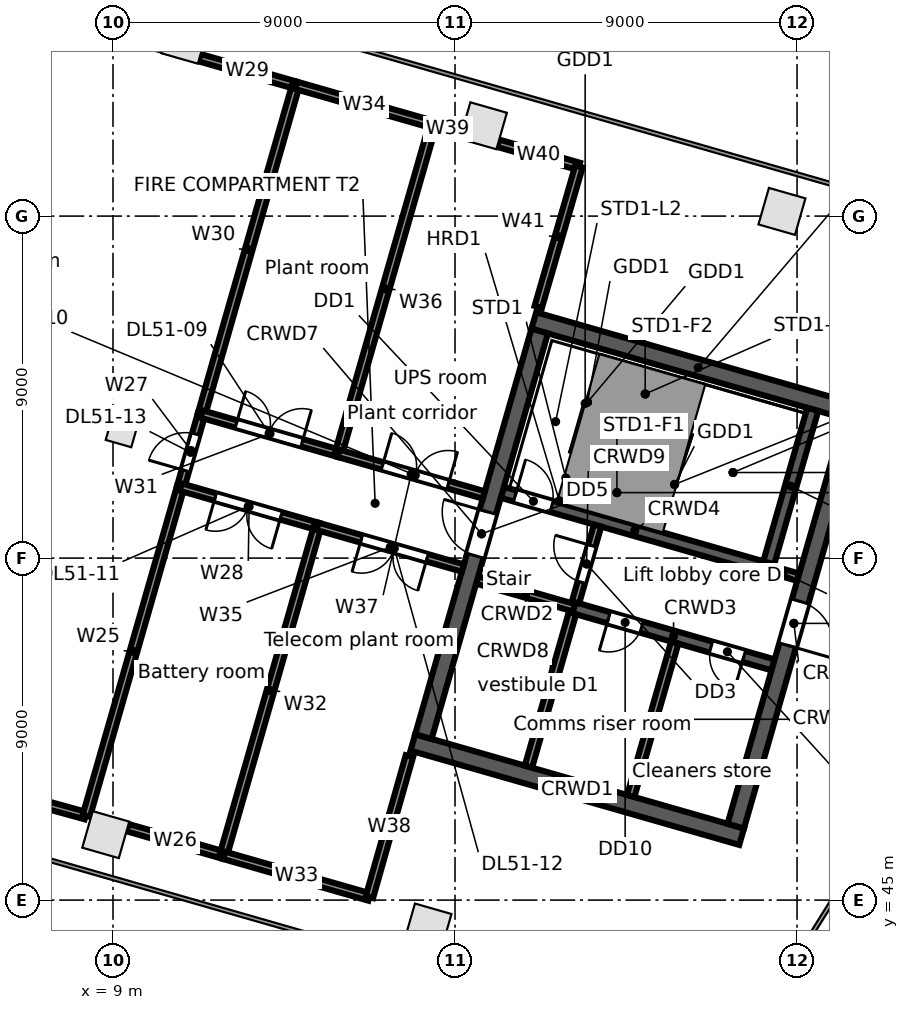
"""IFC4 building model, lengths in metres.
Left out: names, types, materials, properties, quantities, classifications, styles, units other than length and angle.
Written with IfcOpenShell. Run it as: python <this file> out.ifc"""

import sys

from ifc_helpers import new_model, si_unit, direction, frame, frame_2d, origin, origin_2d, place, context, subcontext, project, spatial, rectangle, extrude, element, fill, save


model = new_model("IFC4")
c1 = context("Model", 3, precision=1e-05, world=origin(), true_north=direction((0.0, 1.0)))
c2 = subcontext(c1, "Body", "Model", "MODEL_VIEW")
j1 = project(units=[si_unit("LENGTHUNIT", "METRE"), si_unit("PLANEANGLEUNIT", "RADIAN")], contexts=[c1])
p1 = place(None, origin())
s1 = spatial("IfcSite", under=j1, at=p1, CompositionType="ELEMENT")
p2 = place(p1, origin())
s2 = spatial("IfcBuilding", under=s1, at=p2, CompositionType="ELEMENT")
p3 = place(p2, frame((0.0, 0.0, 230.9)))
s3 = spatial("IfcBuildingStorey", under=s2, at=p3, CompositionType="ELEMENT", Elevation=230.9)
for number, where, z_axis, x_axis in (
    (1, (26.603, 63.124, 0.0), (0.0, 0.0, 1.0), (-0.961, 0.276, 0.0)),
    (2, (18.746, 65.376, 0.0), (0.0, 0.0, 1.0), (-0.961, 0.276, 0.0)),
    (3, (10.89, 67.629, 0.0), (0.0, 0.0, 1.0), (-0.961, 0.276, 0.0)),
    (4, (8.81, 46.722, 0.0), (0.0, 0.0, 1.0), (0.961, -0.276, 0.0)),
    (5, (17.288, 44.291, 0.0), (0.0, 0.0, 1.0), (0.961, -0.276, 0.0)),
):
    element("IfcColumn", number, at=place(p3, frame(where, z_axis=z_axis, x_axis=x_axis)), inside=s3, PredefinedType="COLUMN", context=c2, shape_type="SweptSolid", body=[
        extrude(rectangle(XDim=1.0, YDim=1.0, at=origin_2d()), origin(), (0.0, 0.0, 1.0), 7.8),
    ])
p4 = place(p3, frame((9.241, 57.35, 0.0), z_axis=(0.0, 0.0, 1.0), x_axis=(0.961261695938, -0.275637355817, 0.0)))
e6 = element("IfcColumn", 6, at=p4, inside=s3, PredefinedType="COLUMN", context=c2, shape_type="SweptSolid", body=[
    extrude(rectangle(XDim=0.7, YDim=0.7, at=origin_2d()), origin(), (0.0, 0.0, 1.0), 7.8),
])
p5 = place(p3, frame((16.89, 49.149, 0.0), z_axis=(0.0, 0.0, 1.0), x_axis=(0.96126248289, -0.275634611374, 0.0)))
e7 = element("IfcWall", 7, at=p5, inside=s3, PredefinedType="SOLIDWALL", context=c2, shape_type="SweptSolid", body=[
    extrude(rectangle(XDim=9.0, YDim=0.45, at=frame_2d((4.5, 0.0))), origin(), (0.0, 0.0, 1.0), 7.52),
])
p6 = place(p3, frame((18.583, 53.423, 0.0), z_axis=(0.0, 0.0, 1.0), x_axis=(0.961259287968, -0.275645753268, 0.0)))
e8 = element("IfcWall", 8, at=p6, inside=s3, PredefinedType="SOLIDWALL", context=c2, shape_type="SweptSolid", body=[
    extrude(rectangle(XDim=2.65, YDim=0.2, at=frame_2d((1.325, 0.0))), origin(), (0.0, 0.0, 1.0), 7.52),
])
p7 = place(p3, frame((21.131, 52.692, 0.0), z_axis=(0.0, 0.0, 1.0), x_axis=(0.961261488075, -0.275638080722, 0.0)))
e9 = element("IfcWall", 9, at=p7, inside=s3, PredefinedType="SOLIDWALL", context=c2, shape_type="SweptSolid", body=[
    extrude(rectangle(XDim=5.45, YDim=0.3, at=frame_2d((2.725, 0.0))), origin(), (0.0, 0.0, 1.0), 7.52),
])
p8 = place(p7, frame((0.95, 0.0, 0.0)))
e10 = element("IfcOpeningElement", 10, at=p8, cuts=e9, PredefinedType="OPENING", context=c2, shape_type="SweptSolid", body=[
    extrude(rectangle(XDim=0.9, YDim=2.1, at=frame_2d((0.45, 1.05))), frame((0.0, 0.16, 0.0), z_axis=(0.0, -1.0, 0.0), x_axis=(1.0, 0.0, 0.0)), (0.0, 0.0, 1.0), 0.32),
])
p9 = place(p7, frame((3.75, 0.0, 0.0)))
e11 = element("IfcOpeningElement", 11, at=p9, cuts=e9, PredefinedType="OPENING", context=c2, shape_type="SweptSolid", body=[
    extrude(rectangle(XDim=0.9, YDim=2.1, at=frame_2d((0.45, 1.05))), frame((0.0, 0.16, 0.0), z_axis=(0.0, -1.0, 0.0), x_axis=(1.0, 0.0, 0.0)), (0.0, 0.0, 1.0), 0.32),
])
p10 = place(p3, frame((19.245, 55.73, 0.0), z_axis=(0.0, 0.0, 1.0), x_axis=(0.961263007877, -0.275632780503, 0.0)))
e12 = element("IfcWall", 12, at=p10, inside=s3, PredefinedType="SOLIDWALL", context=c2, shape_type="SweptSolid", body=[
    extrude(rectangle(XDim=7.25, YDim=0.3, at=frame_2d((3.625, 0.0))), origin(), (0.0, 0.0, 1.0), 7.52),
])
p11 = place(p10, frame((0.35, 0.0, 0.0)))
e13 = element("IfcOpeningElement", 13, at=p11, cuts=e12, PredefinedType="OPENING", context=c2, shape_type="SweptSolid", body=[
    extrude(rectangle(XDim=1.0, YDim=2.1, at=frame_2d((0.5, 1.05))), frame((0.0, 0.16, 0.0), z_axis=(0.0, -1.0, 0.0), x_axis=(1.0, 0.0, 0.0)), (0.0, 0.0, 1.0), 0.32),
])
p12 = place(p3, frame((26.214, 53.732, 0.0), z_axis=(0.0, 0.0, 1.0), x_axis=(0.961241665642, -0.275707200184, 0.0)))
e14 = element("IfcWall", 14, at=p12, inside=s3, PredefinedType="SOLIDWALL", context=c2, shape_type="SweptSolid", body=[
    extrude(rectangle(XDim=0.85, YDim=0.2, at=frame_2d((0.425, 0.0))), origin(), (0.0, 0.0, 1.0), 7.52),
])
p13 = place(p3, frame((20.073, 60.252, 0.0), z_axis=(0.0, 0.0, 1.0), x_axis=(0.96126248289, -0.275634611374, 0.0)))
e15 = element("IfcWall", 15, at=p13, inside=s3, PredefinedType="SOLIDWALL", context=c2, shape_type="SweptSolid", body=[
    extrude(rectangle(XDim=9.0, YDim=0.45, at=frame_2d((4.5, 0.0))), origin(), (0.0, 0.0, 1.0), 7.52),
])
p14 = place(p3, frame((17.168, 49.303, 0.0), z_axis=(0.0, 0.0, 1.0), x_axis=(0.275638974822, 0.961261231695, 0.0)))
e16 = element("IfcWall", 16, at=p14, inside=s3, PredefinedType="SOLIDWALL", context=c2, shape_type="SweptSolid", body=[
    extrude(rectangle(XDim=11.1, YDim=0.45, at=frame_2d((5.55, 0.0))), origin(), (0.0, 0.0, 1.0), 7.52),
])
p15 = place(p14, frame((4.95, 0.0, 0.0)))
e17 = element("IfcOpeningElement", 17, at=p15, cuts=e16, PredefinedType="OPENING", context=c2, shape_type="SweptSolid", body=[
    extrude(rectangle(XDim=1.2, YDim=2.1, at=frame_2d((0.6, 1.05))), frame((0.0, 0.235, 0.0), z_axis=(0.0, -1.0, 0.0), x_axis=(1.0, 0.0, 0.0)), (0.0, 0.0, 1.0), 0.47),
])
p16 = place(p3, frame((19.932, 48.511, 0.0), z_axis=(0.0, 0.0, 1.0), x_axis=(0.275642273411, 0.961260285827, 0.0)))
e18 = element("IfcWall", 18, at=p16, inside=s3, PredefinedType="SOLIDWALL", context=c2, shape_type="SweptSolid", body=[
    extrude(rectangle(XDim=4.2, YDim=0.2, at=frame_2d((2.1, 0.0))), origin(), (0.0, 0.0, 1.0), 7.52),
])
p17 = place(p3, frame((21.172, 52.837, 0.0), z_axis=(0.0, 0.0, 1.0), x_axis=(0.275657676022, 0.961255868981, 0.0)))
e19 = element("IfcWall", 19, at=p17, inside=s3, PredefinedType="PARTITIONING", context=c2, shape_type="SweptSolid", body=[
    extrude(rectangle(XDim=2.1, YDim=0.2, at=frame_2d((1.05, 0.0))), origin(), (0.0, 0.0, 1.0), 7.52),
])
p18 = place(p17, frame((0.55, 0.0, 0.0)))
e20 = element("IfcOpeningElement", 20, at=p18, cuts=e19, PredefinedType="OPENING", context=c2, shape_type="SweptSolid", body=[
    extrude(rectangle(XDim=1.0, YDim=2.1, at=frame_2d((0.5, 1.05))), frame((0.0, 0.11, 0.0), z_axis=(0.0, -1.0, 0.0), x_axis=(1.0, 0.0, 0.0)), (0.0, 0.0, 1.0), 0.22),
])
p19 = place(p3, frame((22.623, 47.739, 0.0), z_axis=(0.0, 0.0, 1.0), x_axis=(0.275642273411, 0.961260285827, 0.0)))
e21 = element("IfcWall", 21, at=p19, inside=s3, PredefinedType="PARTITIONING", context=c2, shape_type="SweptSolid", body=[
    extrude(rectangle(XDim=4.2, YDim=0.2, at=frame_2d((2.1, 0.0))), origin(), (0.0, 0.0, 1.0), 7.52),
])
p20 = place(p3, frame((26.256, 53.876, 0.0), z_axis=(0.0, 0.0, 1.0), x_axis=(0.275588560745, 0.96127568636, 0.0)))
e22 = element("IfcWall", 22, at=p20, inside=s3, PredefinedType="SOLIDWALL", context=c2, shape_type="SweptSolid", body=[
    extrude(rectangle(XDim=4.2, YDim=0.3, at=frame_2d((2.1, 0.0))), origin(), (0.0, 0.0, 1.0), 7.52),
])
p21 = place(p3, frame((25.387, 46.947, 0.0), z_axis=(0.0, 0.0, 1.0), x_axis=(0.275638974822, 0.961261231695, 0.0)))
e23 = element("IfcWall", 23, at=p21, inside=s3, PredefinedType="SOLIDWALL", context=c2, shape_type="SweptSolid", body=[
    extrude(rectangle(XDim=11.1, YDim=0.45, at=frame_2d((5.55, 0.0))), origin(), (0.0, 0.0, 1.0), 7.52),
])
p22 = place(p21, frame((4.95, 0.0, 0.0)))
e24 = element("IfcOpeningElement", 24, at=p22, cuts=e23, PredefinedType="OPENING", context=c2, shape_type="SweptSolid", body=[
    extrude(rectangle(XDim=1.2, YDim=2.1, at=frame_2d((0.6, 1.05))), frame((0.0, 0.235, 0.0), z_axis=(0.0, -1.0, 0.0), x_axis=(1.0, 0.0, 0.0)), (0.0, 0.0, 1.0), 0.47),
])
p23 = place(p3, frame((0.02, 49.495, 0.0), z_axis=(0.0, 0.0, 1.0), x_axis=(0.964176057391, -0.265263134179, 0.0)))
e25 = element("IfcWall", 25, at=p23, inside=s3, PredefinedType="PARTITIONING", context=c2, shape_type="SweptSolid", body=[
    extrude(rectangle(XDim=8.566, YDim=0.2, at=frame_2d((4.283, 0.0))), origin(), (0.0, 0.0, 1.0), 7.52),
])
p24 = place(p3, frame((8.298, 47.218, 0.0), z_axis=(0.0, 0.0, 1.0), x_axis=(0.275674053528, 0.961251172281, 0.0)))
e26 = element("IfcWall", 26, at=p24, inside=s3, PredefinedType="PARTITIONING", context=c2, shape_type="SweptSolid", body=[
    extrude(rectangle(XDim=9.0, YDim=0.2, at=frame_2d((4.5, 0.0))), origin(), (0.0, 0.0, 1.0), 6.8),
])
p25 = place(p3, frame((9.383, 46.907, 0.0), z_axis=(0.0, 0.0, 1.0), x_axis=(0.961237645594, -0.275721215529, 0.0)))
e27 = element("IfcWall", 27, at=p25, inside=s3, PredefinedType="PARTITIONING", context=c2, shape_type="SweptSolid", body=[
    extrude(rectangle(XDim=2.611, YDim=0.2, at=frame_2d((1.306, 0.0))), origin(), (0.0, 0.0, 1.0), 7.52),
])
p26 = place(p3, frame((10.779, 55.869, 0.0), z_axis=(0.0, 0.0, 1.0), x_axis=(0.275575706981, 0.961279371318, 0.0)))
e28 = element("IfcWall", 28, at=p26, inside=s3, PredefinedType="PARTITIONING", context=c2, shape_type="SweptSolid", body=[
    extrude(rectangle(XDim=2.0, YDim=0.2, at=frame_2d((1.0, 0.0))), origin(), (0.0, 0.0, 1.0), 6.7),
])
p27 = place(p26, frame((0.45, 0.0, 0.0)))
e29 = element("IfcOpeningElement", 29, at=p27, cuts=e28, PredefinedType="OPENING", context=c2, shape_type="SweptSolid", body=[
    extrude(rectangle(XDim=1.0, YDim=2.1, at=frame_2d((0.5, 1.05))), frame((0.0, 0.11, 0.0), z_axis=(0.0, -1.0, 0.0), x_axis=(1.0, 0.0, 0.0)), (0.0, 0.0, 1.0), 0.22),
])
p28 = place(p3, frame((10.779, 55.869, 0.0), z_axis=(0.0, 0.0, 1.0), x_axis=(0.961245866545, -0.275692553489, 0.0)))
e30 = element("IfcWall", 30, at=p28, inside=s3, PredefinedType="PARTITIONING", context=c2, shape_type="SweptSolid", body=[
    extrude(rectangle(XDim=3.75, YDim=0.2, at=frame_2d((1.875, 0.0))), origin(), (0.0, 0.0, 1.0), 6.7),
])
p29 = place(p28, frame((0.95, 0.0, 0.0)))
e31 = element("IfcOpeningElement", 31, at=p29, cuts=e30, PredefinedType="OPENING", context=c2, shape_type="SweptSolid", body=[
    extrude(rectangle(XDim=1.8, YDim=2.1, at=frame_2d((0.9, 1.05))), frame((0.0, 0.11, 0.0), z_axis=(0.0, -1.0, 0.0), x_axis=(1.0, 0.0, 0.0)), (0.0, 0.0, 1.0), 0.22),
])
p30 = place(p3, frame((11.278, 67.169, 0.0), z_axis=(0.0, 0.0, 1.0), x_axis=(0.961252227854, -0.275670372813, 0.0)))
e32 = element("IfcWall", 32, at=p30, inside=s3, PredefinedType="PARTITIONING", context=c2, shape_type="SweptSolid", body=[
    extrude(rectangle(XDim=2.615, YDim=0.2, at=frame_2d((1.308, 0.0))), origin(), (0.0, 0.0, 1.0), 7.52),
])
p31 = place(p3, frame((11.33, 57.791, 0.0), z_axis=(0.0, 0.0, 1.0), x_axis=(0.275638114595, 0.961261478362, 0.0)))
e33 = element("IfcWall", 33, at=p31, inside=s3, PredefinedType="PARTITIONING", context=c2, shape_type="SweptSolid", body=[
    extrude(rectangle(XDim=9.001, YDim=0.2, at=frame_2d((4.5, 0.0))), origin(), (0.0, 0.0, 1.0), 6.692),
])
p32 = place(p3, frame((11.33, 57.791, 0.0), z_axis=(0.0, 0.0, 1.0), x_axis=(0.961314848061, -0.275451924837, 0.0)))
e34 = element("IfcWall", 34, at=p32, inside=s3, PredefinedType="PARTITIONING", context=c2, shape_type="SweptSolid", body=[
    extrude(rectangle(XDim=3.75, YDim=0.2, at=frame_2d((1.875, 0.0))), origin(), (0.0, 0.0, 1.0), 7.52),
])
p33 = place(p32, frame((0.95, 0.0, 0.0)))
e35 = element("IfcOpeningElement", 35, at=p33, cuts=e34, PredefinedType="OPENING", context=c2, shape_type="SweptSolid", body=[
    extrude(rectangle(XDim=1.8, YDim=2.1, at=frame_2d((0.9, 1.05))), frame((0.0, 0.11, 0.0), z_axis=(0.0, -1.0, 0.0), x_axis=(1.0, 0.0, 0.0)), (0.0, 0.0, 1.0), 0.22),
])
p34 = place(p3, frame((11.903, 46.184, 0.0), z_axis=(0.0, 0.0, 1.0), x_axis=(0.275674053528, 0.961251172281, 0.0)))
e36 = element("IfcWall", 36, at=p34, inside=s3, PredefinedType="PARTITIONING", context=c2, shape_type="SweptSolid", body=[
    extrude(rectangle(XDim=9.0, YDim=0.2, at=frame_2d((4.5, 0.0))), origin(), (0.0, 0.0, 1.0), 7.52),
])
p35 = place(p3, frame((11.922, 46.178, 0.0), z_axis=(0.0, 0.0, 1.0), x_axis=(0.961271234801, -0.275604087675, 0.0)))
e37 = element("IfcWall", 37, at=p35, inside=s3, PredefinedType="PARTITIONING", context=c2, shape_type="SweptSolid", body=[
    extrude(rectangle(XDim=3.98, YDim=0.2, at=frame_2d((1.99, 0.0))), origin(), (0.0, 0.0, 1.0), 7.52),
])
p36 = place(p3, frame((13.821, 66.44, 0.0), z_axis=(0.0, 0.0, 1.0), x_axis=(0.961271569029, -0.27560292193, 0.0)))
e38 = element("IfcWall", 38, at=p36, inside=s3, PredefinedType="PARTITIONING", context=c2, shape_type="SweptSolid", body=[
    extrude(rectangle(XDim=3.729, YDim=0.2, at=frame_2d((1.865, 0.0))), origin(), (0.0, 0.0, 1.0), 7.52),
])
p37 = place(p3, frame((14.384, 54.835, 0.0), z_axis=(0.0, 0.0, 1.0), x_axis=(0.961261679898, -0.275637411757, 0.0)))
e39 = element("IfcWall", 39, at=p37, inside=s3, PredefinedType="PARTITIONING", context=c2, shape_type="SweptSolid", body=[
    extrude(rectangle(XDim=3.976, YDim=0.2, at=frame_2d((1.988, 0.0))), origin(), (0.0, 0.0, 1.0), 7.52),
])
p38 = place(p37, frame((1.2, 0.0, 0.0)))
e40 = element("IfcOpeningElement", 40, at=p38, cuts=e39, PredefinedType="OPENING", context=c2, shape_type="SweptSolid", body=[
    extrude(rectangle(XDim=1.8, YDim=2.1, at=frame_2d((0.9, 1.05))), frame((0.0, 0.11, 0.0), z_axis=(0.0, -1.0, 0.0), x_axis=(1.0, 0.0, 0.0)), (0.0, 0.0, 1.0), 0.22),
])
p39 = place(p3, frame((14.935, 56.758, 0.0), z_axis=(0.0, 0.0, 1.0), x_axis=(0.275674053528, 0.961251172281, 0.0)))
e41 = element("IfcWall", 41, at=p39, inside=s3, PredefinedType="PARTITIONING", context=c2, shape_type="SweptSolid", body=[
    extrude(rectangle(XDim=9.0, YDim=0.2, at=frame_2d((4.5, 0.0))), origin(), (0.0, 0.0, 1.0), 6.692),
])
p40 = place(p3, frame((14.935, 56.758, 0.0), z_axis=(0.0, 0.0, 1.0), x_axis=(0.961261679898, -0.275637411757, 0.0)))
e42 = element("IfcWall", 42, at=p40, inside=s3, PredefinedType="PARTITIONING", context=c2, shape_type="SweptSolid", body=[
    extrude(rectangle(XDim=3.976, YDim=0.2, at=frame_2d((1.988, 0.0))), origin(), (0.0, 0.0, 1.0), 6.7),
])
p41 = place(p40, frame((1.2, 0.0, 0.0)))
e43 = element("IfcOpeningElement", 43, at=p41, cuts=e42, PredefinedType="OPENING", context=c2, shape_type="SweptSolid", body=[
    extrude(rectangle(XDim=1.8, YDim=2.1, at=frame_2d((0.9, 1.05))), frame((0.0, 0.11, 0.0), z_axis=(0.0, -1.0, 0.0), x_axis=(1.0, 0.0, 0.0)), (0.0, 0.0, 1.0), 0.22),
])
p42 = place(p3, frame((15.748, 45.081, 0.0), z_axis=(0.0, 0.0, 1.0), x_axis=(0.272987031543, 0.962017713251, 0.0)))
e44 = element("IfcWall", 44, at=p42, inside=s3, PredefinedType="PARTITIONING", context=c2, shape_type="SweptSolid", body=[
    extrude(rectangle(XDim=3.85, YDim=0.2, at=frame_2d((1.925, 0.0))), origin(), (0.0, 0.0, 1.0), 7.52),
])
p43 = place(p3, frame((17.435, 65.404, 0.0), z_axis=(0.0, 0.0, 1.0), x_axis=(0.96107880111, -0.276274389072, 0.0)))
e45 = element("IfcWall", 45, at=p43, inside=s3, PredefinedType="PARTITIONING", context=c2, shape_type="SweptSolid", body=[
    extrude(rectangle(XDim=0.768, YDim=0.2, at=frame_2d((0.384, 0.0))), origin(), (0.0, 0.0, 1.0), 7.52),
])
p44 = place(p3, frame((19.135, 64.917, 0.0), z_axis=(0.0, 0.0, 1.0), x_axis=(0.961202561054, -0.275843500238, 0.0)))
e46 = element("IfcWall", 46, at=p44, inside=s3, PredefinedType="PARTITIONING", context=c2, shape_type="SweptSolid", body=[
    extrude(rectangle(XDim=2.212, YDim=0.2, at=frame_2d((1.106, 0.0))), origin(), (0.0, 0.0, 1.0), 7.52),
])
p45 = place(p3, frame((20.19, 60.608, 0.0), z_axis=(0.0, 0.0, 1.0), x_axis=(0.278127347834, 0.960544209491, 0.0)))
e47 = element("IfcWall", 47, at=p45, inside=s3, PredefinedType="PARTITIONING", context=c2, shape_type="SweptSolid", body=[
    extrude(rectangle(XDim=3.851, YDim=0.2, at=frame_2d((1.925, 0.0))), origin(), (0.0, 0.0, 1.0), 7.52),
])
p46 = place(p11, origin())
e48 = element("IfcDoor", 48, at=p46, inside=s3, OperationType="SINGLE_SWING_LEFT", PredefinedType="DOOR", context=c2, shape_type="SweptSolid", body=[
    extrude(rectangle(XDim=1.0, YDim=2.1, at=frame_2d((0.5, 1.05))), frame((0.0, 0.025, 0.0), z_axis=(0.0, -1.0, 0.0), x_axis=(1.0, 0.0, 0.0)), (0.0, 0.0, 1.0), 0.05),
])
fill(e13, e48)
p47 = place(p18, origin())
e49 = element("IfcDoor", 49, at=p47, inside=s3, OperationType="SINGLE_SWING_RIGHT", PredefinedType="DOOR", context=c2, shape_type="SweptSolid", body=[
    extrude(rectangle(XDim=1.0, YDim=2.1, at=frame_2d((0.5, 1.05))), frame((0.0, 0.025, 0.0), z_axis=(0.0, -1.0, 0.0), x_axis=(1.0, 0.0, 0.0)), (0.0, 0.0, 1.0), 0.05),
])
fill(e20, e49)
p48 = place(p15, origin())
e50 = element("IfcDoor", 50, at=p48, inside=s3, OperationType="SINGLE_SWING_RIGHT", PredefinedType="DOOR", context=c2, shape_type="SweptSolid", body=[
    extrude(rectangle(XDim=1.2, YDim=2.1, at=frame_2d((0.6, 1.05))), frame((0.0, 0.025, 0.0), z_axis=(0.0, -1.0, 0.0), x_axis=(1.0, 0.0, 0.0)), (0.0, 0.0, 1.0), 0.05),
])
fill(e17, e50)
p49 = place(p22, frame((1.2, 0.0, 0.0), z_axis=(0.0, 0.0, 1.0), x_axis=(-1.0, 0.0, 0.0)))
e51 = element("IfcDoor", 51, at=p49, inside=s3, OperationType="SINGLE_SWING_RIGHT", PredefinedType="DOOR", context=c2, shape_type="SweptSolid", body=[
    extrude(rectangle(XDim=1.2, YDim=2.1, at=frame_2d((0.6, 1.05))), frame((0.0, 0.025, 0.0), z_axis=(0.0, -1.0, 0.0), x_axis=(1.0, 0.0, 0.0)), (0.0, 0.0, 1.0), 0.05),
])
fill(e24, e51)
p50 = place(p8, frame((0.9, 0.0, 0.0), z_axis=(0.0, 0.0, 1.0), x_axis=(-1.0, 0.0, 0.0)))
e52 = element("IfcDoor", 52, at=p50, inside=s3, OperationType="SINGLE_SWING_RIGHT", PredefinedType="DOOR", context=c2, shape_type="SweptSolid", body=[
    extrude(rectangle(XDim=0.9, YDim=2.1, at=frame_2d((0.45, 1.05))), frame((0.0, 0.025, 0.0), z_axis=(0.0, -1.0, 0.0), x_axis=(1.0, 0.0, 0.0)), (0.0, 0.0, 1.0), 0.05),
])
fill(e10, e52)
p51 = place(p9, frame((0.9, 0.0, 0.0), z_axis=(0.0, 0.0, 1.0), x_axis=(-1.0, 0.0, 0.0)))
e53 = element("IfcDoor", 53, at=p51, inside=s3, OperationType="SINGLE_SWING_LEFT", PredefinedType="DOOR", context=c2, shape_type="SweptSolid", body=[
    extrude(rectangle(XDim=0.9, YDim=2.1, at=frame_2d((0.45, 1.05))), frame((0.0, 0.025, 0.0), z_axis=(0.0, -1.0, 0.0), x_axis=(1.0, 0.0, 0.0)), (0.0, 0.0, 1.0), 0.05),
])
fill(e11, e53)
p52 = place(p33, origin())
e54 = element("IfcDoor", 54, at=p52, inside=s3, OperationType="DOUBLE_DOOR_SINGLE_SWING", PredefinedType="DOOR", context=c2, shape_type="SweptSolid", body=[
    extrude(rectangle(XDim=1.8, YDim=2.1, at=frame_2d((0.9, 1.05))), frame((0.0, 0.025, 0.0), z_axis=(0.0, -1.0, 0.0), x_axis=(1.0, 0.0, 0.0)), (0.0, 0.0, 1.0), 0.05),
])
fill(e35, e54)
p53 = place(p41, origin())
e55 = element("IfcDoor", 55, at=p53, inside=s3, OperationType="DOUBLE_DOOR_SINGLE_SWING", PredefinedType="DOOR", context=c2, shape_type="SweptSolid", body=[
    extrude(rectangle(XDim=1.8, YDim=2.1, at=frame_2d((0.9, 1.05))), frame((0.0, 0.025, 0.0), z_axis=(0.0, -1.0, 0.0), x_axis=(1.0, 0.0, 0.0)), (0.0, 0.0, 1.0), 0.05),
])
fill(e43, e55)
p54 = place(p29, frame((1.8, 0.0, 0.0), z_axis=(0.0, 0.0, 1.0), x_axis=(-1.0, 0.0, 0.0)))
e56 = element("IfcDoor", 56, at=p54, inside=s3, OperationType="DOUBLE_DOOR_SINGLE_SWING", PredefinedType="DOOR", context=c2, shape_type="SweptSolid", body=[
    extrude(rectangle(XDim=1.8, YDim=2.1, at=frame_2d((0.9, 1.05))), frame((0.0, 0.025, 0.0), z_axis=(0.0, -1.0, 0.0), x_axis=(1.0, 0.0, 0.0)), (0.0, 0.0, 1.0), 0.05),
])
fill(e31, e56)
p55 = place(p38, frame((1.8, 0.0, 0.0), z_axis=(0.0, 0.0, 1.0), x_axis=(-1.0, 0.0, 0.0)))
e57 = element("IfcDoor", 57, at=p55, inside=s3, OperationType="DOUBLE_DOOR_SINGLE_SWING", PredefinedType="DOOR", context=c2, shape_type="SweptSolid", body=[
    extrude(rectangle(XDim=1.8, YDim=2.1, at=frame_2d((0.9, 1.05))), frame((0.0, 0.025, 0.0), z_axis=(0.0, -1.0, 0.0), x_axis=(1.0, 0.0, 0.0)), (0.0, 0.0, 1.0), 0.05),
])
fill(e40, e57)
p56 = place(p27, origin())
e58 = element("IfcDoor", 58, at=p56, inside=s3, OperationType="SINGLE_SWING_LEFT", PredefinedType="DOOR", context=c2, shape_type="SweptSolid", body=[
    extrude(rectangle(XDim=1.0, YDim=2.1, at=frame_2d((0.5, 1.05))), frame((0.0, 0.025, 0.0), z_axis=(0.0, -1.0, 0.0), x_axis=(1.0, 0.0, 0.0)), (0.0, 0.0, 1.0), 0.05),
])
fill(e29, e58)
save(model, sys.argv[1])
